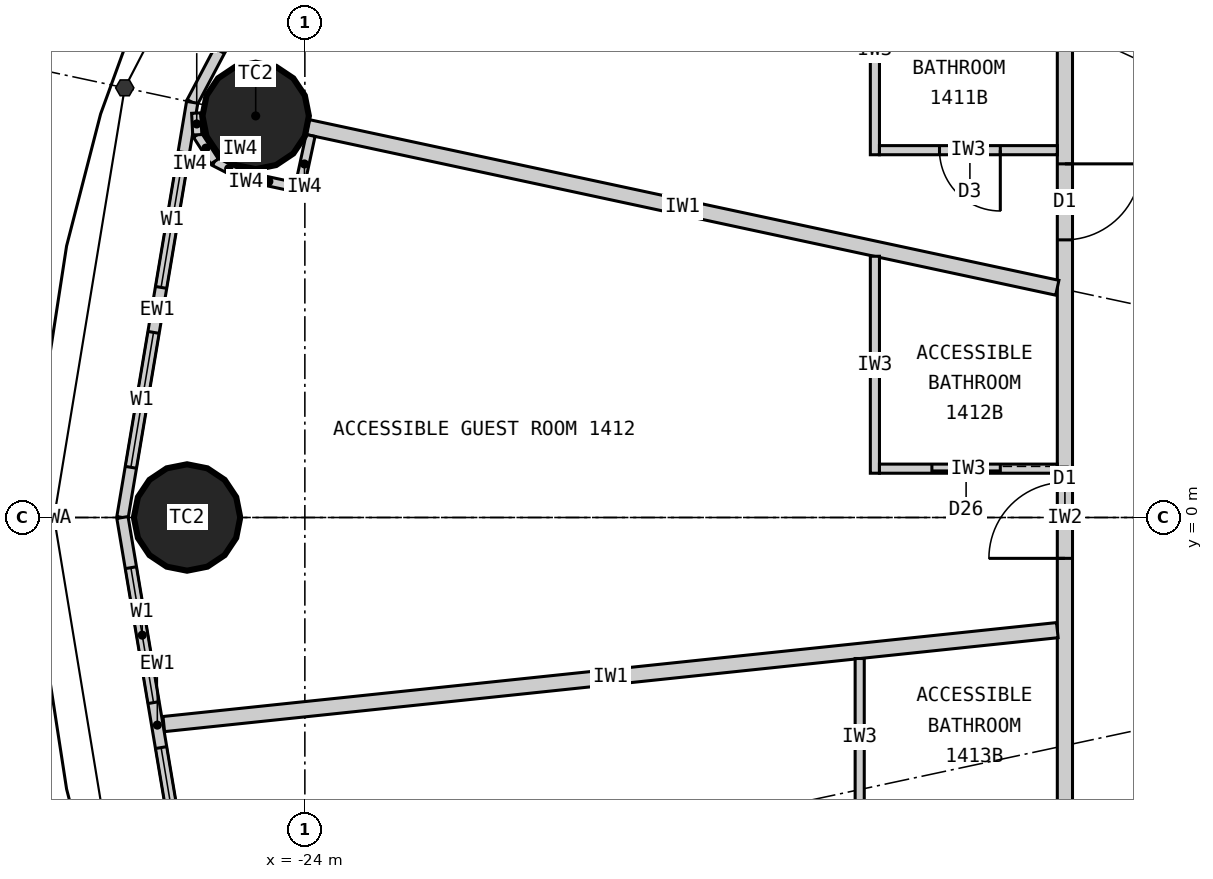
"""IFC4 building model, lengths in metres.
Left out: names, types, materials, properties, quantities, classifications, styles, units other than length and angle.
Written with IfcOpenShell. Run it as: python <this file> out.ifc"""

import sys

from ifc_helpers import new_model, si_unit, direction, frame, frame_2d, origin, origin_2d, place, context, subcontext, project, spatial, rectangle, circle, extrude, element, fill, save


model = new_model("IFC4")
c1 = context("Model", 3, precision=1e-05, world=origin(), true_north=direction((0.0, 1.0)))
c2 = subcontext(c1, "Body", "Model", "MODEL_VIEW")
j1 = project(units=[si_unit("LENGTHUNIT", "METRE"), si_unit("PLANEANGLEUNIT", "RADIAN")], contexts=[c1])
p1 = place(None, origin())
s1 = spatial("IfcSite", under=j1, at=p1, CompositionType="ELEMENT")
p2 = place(p1, origin())
s2 = spatial("IfcBuilding", under=s1, at=p2, CompositionType="ELEMENT")
p3 = place(p2, frame((0.0, 0.0, 60.6)))
s3 = spatial("IfcBuildingStorey", under=s2, at=p3, CompositionType="ELEMENT", Elevation=60.6)
for number, where, z_axis, x_axis in (
    (1, (-24.647, 5.283, 0.0), (0.0, 0.0, 1.0), (1.0, 0.0, 0.0)),
    (2, (-25.55, 0.0, 0.0), (0.0, 0.0, 1.0), (1.0, 0.0, 0.0)),
):
    element("IfcColumn", number, at=place(p3, frame(where, z_axis=z_axis, x_axis=x_axis)), inside=s3, PredefinedType="COLUMN", context=c2, shape_type="SweptSolid", body=[
        extrude(circle(Radius=0.7, at=origin_2d()), origin(), (0.0, 0.0, 1.0), 3.3),
    ])
p4 = place(p3, frame((-22.803, 10.532, 0.0), z_axis=(0.0, 0.0, 1.0), x_axis=(-0.467296867008, -0.884100468321, 0.0)))
e3 = element("IfcWall", 3, at=p4, inside=s3, PredefinedType="ELEMENTEDWALL", context=c2, shape_type="SweptSolid", body=[
    extrude(rectangle(XDim=5.734, YDim=0.15, at=frame_2d((2.867, 0.0))), origin(), (0.0, 0.0, 1.0), 3.12),
])
p5 = place(p4, frame((0.767, 0.0, 0.9)))
e4 = element("IfcOpeningElement", 4, at=p5, cuts=e3, PredefinedType="OPENING", context=c2, shape_type="SweptSolid", body=[
    extrude(rectangle(XDim=1.8, YDim=1.9, at=frame_2d((0.9, 0.95))), frame((0.0, 0.085, 0.0), z_axis=(0.0, -1.0, 0.0), x_axis=(1.0, 0.0, 0.0)), (0.0, 0.0, 1.0), 0.17),
])
p6 = place(p4, frame((3.167, 0.0, 0.9)))
e5 = element("IfcOpeningElement", 5, at=p6, cuts=e3, PredefinedType="OPENING", context=c2, shape_type="SweptSolid", body=[
    extrude(rectangle(XDim=1.8, YDim=1.9, at=frame_2d((0.9, 0.95))), frame((0.0, 0.085, 0.0), z_axis=(0.0, -1.0, 0.0), x_axis=(1.0, 0.0, 0.0)), (0.0, 0.0, 1.0), 0.17),
])
p7 = place(p3, frame((-25.482, 5.462, 0.0), z_axis=(0.0, 0.0, 1.0), x_axis=(-0.165642551694, -0.986185857264, 0.0)))
e6 = element("IfcWall", 6, at=p7, inside=s3, PredefinedType="ELEMENTEDWALL", context=c2, shape_type="SweptSolid", body=[
    extrude(rectangle(XDim=5.539, YDim=0.15, at=frame_2d((2.77, 0.0))), origin(), (0.0, 0.0, 1.0), 3.12),
])
p8 = place(p7, frame((0.669, 0.0, 0.9)))
e7 = element("IfcOpeningElement", 7, at=p8, cuts=e6, PredefinedType="OPENING", context=c2, shape_type="SweptSolid", body=[
    extrude(rectangle(XDim=1.8, YDim=1.9, at=frame_2d((0.9, 0.95))), frame((0.0, 0.085, 0.0), z_axis=(0.0, -1.0, 0.0), x_axis=(1.0, 0.0, 0.0)), (0.0, 0.0, 1.0), 0.17),
])
p9 = place(p7, frame((3.07, 0.0, 0.9)))
e8 = element("IfcOpeningElement", 8, at=p9, cuts=e6, PredefinedType="OPENING", context=c2, shape_type="SweptSolid", body=[
    extrude(rectangle(XDim=1.8, YDim=1.9, at=frame_2d((0.9, 0.95))), frame((0.0, 0.085, 0.0), z_axis=(0.0, -1.0, 0.0), x_axis=(1.0, 0.0, 0.0)), (0.0, 0.0, 1.0), 0.17),
])
p10 = place(p3, frame((-26.4, 0.0, 0.0), z_axis=(0.0, 0.0, 1.0), x_axis=(0.165642551694, -0.986185857264, 0.0)))
e9 = element("IfcWall", 9, at=p10, inside=s3, PredefinedType="ELEMENTEDWALL", context=c2, shape_type="SweptSolid", body=[
    extrude(rectangle(XDim=5.539, YDim=0.15, at=frame_2d((2.77, 0.0))), origin(), (0.0, 0.0, 1.0), 3.12),
])
p11 = place(p10, frame((0.669, 0.0, 0.9)))
e10 = element("IfcOpeningElement", 10, at=p11, cuts=e9, PredefinedType="OPENING", context=c2, shape_type="SweptSolid", body=[
    extrude(rectangle(XDim=1.8, YDim=1.9, at=frame_2d((0.9, 0.95))), frame((0.0, 0.085, 0.0), z_axis=(0.0, -1.0, 0.0), x_axis=(1.0, 0.0, 0.0)), (0.0, 0.0, 1.0), 0.17),
])
p12 = place(p10, frame((3.07, 0.0, 0.9)))
e11 = element("IfcOpeningElement", 11, at=p12, cuts=e9, PredefinedType="OPENING", context=c2, shape_type="SweptSolid", body=[
    extrude(rectangle(XDim=1.8, YDim=1.9, at=frame_2d((0.9, 0.95))), frame((0.0, 0.085, 0.0), z_axis=(0.0, -1.0, 0.0), x_axis=(1.0, 0.0, 0.0)), (0.0, 0.0, 1.0), 0.17),
])
p13 = place(p3, frame((-14.0, 9.9, 0.0), z_axis=(0.0, 0.0, 1.0), x_axis=(0.0, -1.0, 0.0)))
e12 = element("IfcWall", 12, at=p13, inside=s3, PredefinedType="PARTITIONING", context=c2, shape_type="SweptSolid", body=[
    extrude(rectangle(XDim=19.8, YDim=0.2, at=frame_2d((9.9, 0.0))), origin(), (0.0, 0.0, 1.0), 3.12),
])
p14 = place(p13, frame((0.103, 0.0, 0.0)))
e13 = element("IfcOpeningElement", 13, at=p14, cuts=e12, PredefinedType="OPENING", context=c2, shape_type="SweptSolid", body=[
    extrude(rectangle(XDim=1.0, YDim=2.2, at=frame_2d((0.5, 1.1))), frame((0.0, 0.11, 0.0), z_axis=(0.0, -1.0, 0.0), x_axis=(1.0, 0.0, 0.0)), (0.0, 0.0, 1.0), 0.22),
])
p15 = place(p13, frame((5.248, 0.0, 0.0)))
e14 = element("IfcOpeningElement", 14, at=p15, cuts=e12, PredefinedType="OPENING", context=c2, shape_type="SweptSolid", body=[
    extrude(rectangle(XDim=1.0, YDim=2.2, at=frame_2d((0.5, 1.1))), frame((0.0, 0.11, 0.0), z_axis=(0.0, -1.0, 0.0), x_axis=(1.0, 0.0, 0.0)), (0.0, 0.0, 1.0), 0.22),
])
p16 = place(p13, frame((9.438, 0.0, 0.0)))
e15 = element("IfcOpeningElement", 15, at=p16, cuts=e12, PredefinedType="OPENING", context=c2, shape_type="SweptSolid", body=[
    extrude(rectangle(XDim=1.0, YDim=2.2, at=frame_2d((0.5, 1.1))), frame((0.0, 0.11, 0.0), z_axis=(0.0, -1.0, 0.0), x_axis=(1.0, 0.0, 0.0)), (0.0, 0.0, 1.0), 0.22),
])
p17 = place(p13, frame((13.942, 0.0, 0.0)))
e16 = element("IfcOpeningElement", 16, at=p17, cuts=e12, PredefinedType="OPENING", context=c2, shape_type="SweptSolid", body=[
    extrude(rectangle(XDim=1.0, YDim=2.2, at=frame_2d((0.5, 1.1))), frame((0.0, 0.11, 0.0), z_axis=(0.0, -1.0, 0.0), x_axis=(1.0, 0.0, 0.0)), (0.0, 0.0, 1.0), 0.22),
])
p18 = place(p13, frame((18.698, 0.0, 0.0)))
e17 = element("IfcOpeningElement", 17, at=p18, cuts=e12, PredefinedType="OPENING", context=c2, shape_type="SweptSolid", body=[
    extrude(rectangle(XDim=1.0, YDim=2.2, at=frame_2d((0.5, 1.1))), frame((0.0, 0.11, 0.0), z_axis=(0.0, -1.0, 0.0), x_axis=(1.0, 0.0, 0.0)), (0.0, 0.0, 1.0), 0.22),
])
p19 = place(p3, frame((-14.1, 3.022, 0.0), z_axis=(0.0, 0.0, 1.0), x_axis=(-0.977790014929, 0.209586943072, 0.0)))
e18 = element("IfcWall", 18, at=p19, inside=s3, PredefinedType="PARTITIONING", context=c2, shape_type="SweptSolid", body=[
    extrude(rectangle(XDim=10.087, YDim=0.2, at=frame_2d((5.043, 0.0))), origin(), (0.0, 0.0, 1.0), 2.32),
])
p20 = place(p3, frame((-14.1, -1.482, 0.0), z_axis=(0.0, 0.0, 1.0), x_axis=(-0.994522076235, -0.104526742422, 0.0)))
e19 = element("IfcWall", 19, at=p20, inside=s3, PredefinedType="PARTITIONING", context=c2, shape_type="SweptSolid", body=[
    extrude(rectangle(XDim=11.821, YDim=0.2, at=frame_2d((5.91, 0.0))), origin(), (0.0, 0.0, 1.0), 2.32),
])
p21 = place(p3, frame((-16.5, 7.521, 0.0), z_axis=(0.0, 0.0, 1.0), x_axis=(0.0, -1.0, 0.0)))
e20 = element("IfcWall", 20, at=p21, inside=s3, PredefinedType="PARTITIONING", context=c2, shape_type="SweptSolid", body=[
    extrude(rectangle(XDim=2.749, YDim=0.12, at=frame_2d((1.374, 0.0))), origin(), (0.0, 0.0, 1.0), 3.12),
])
p22 = place(p3, frame((-14.1, 4.833, 0.0), z_axis=(0.0, 0.0, 1.0), x_axis=(-1.0, 0.0, 0.0)))
e21 = element("IfcWall", 21, at=p22, inside=s3, PredefinedType="PARTITIONING", context=c2, shape_type="SweptSolid", body=[
    extrude(rectangle(XDim=2.34, YDim=0.12, at=frame_2d((1.17, 0.0))), origin(), (0.0, 0.0, 1.0), 3.12),
])
p23 = place(p22, frame((0.75, 0.0, 0.0)))
e22 = element("IfcOpeningElement", 22, at=p23, cuts=e21, PredefinedType="OPENING", context=c2, shape_type="SweptSolid", body=[
    extrude(rectangle(XDim=0.8, YDim=2.1, at=frame_2d((0.4, 1.05))), frame((0.0, 0.07, 0.0), z_axis=(0.0, -1.0, 0.0), x_axis=(1.0, 0.0, 0.0)), (0.0, 0.0, 1.0), 0.14),
])
p24 = place(p3, frame((-16.5, 3.437, 0.0), z_axis=(0.0, 0.0, 1.0), x_axis=(0.0, -1.0, 0.0)))
e23 = element("IfcWall", 23, at=p24, inside=s3, PredefinedType="PARTITIONING", context=c2, shape_type="SweptSolid", body=[
    extrude(rectangle(XDim=2.854, YDim=0.12, at=frame_2d((1.427, 0.0))), origin(), (0.0, 0.0, 1.0), 3.12),
])
p25 = place(p3, frame((-14.1, 0.643, 0.0), z_axis=(0.0, 0.0, 1.0), x_axis=(-1.0, 0.0, 0.0)))
e24 = element("IfcWall", 24, at=p25, inside=s3, PredefinedType="PARTITIONING", context=c2, shape_type="SweptSolid", body=[
    extrude(rectangle(XDim=2.34, YDim=0.12, at=frame_2d((1.17, 0.0))), origin(), (0.0, 0.0, 1.0), 3.12),
])
p26 = place(p25, frame((0.75, 0.0, 0.0)))
e25 = element("IfcOpeningElement", 25, at=p26, cuts=e24, PredefinedType="OPENING", context=c2, shape_type="SweptSolid", body=[
    extrude(rectangle(XDim=0.9, YDim=2.1, at=frame_2d((0.45, 1.05))), frame((0.0, 0.07, 0.0), z_axis=(0.0, -1.0, 0.0), x_axis=(1.0, 0.0, 0.0)), (0.0, 0.0, 1.0), 0.14),
])
p27 = place(p3, frame((-16.7, -1.855, 0.0), z_axis=(0.0, 0.0, 1.0), x_axis=(0.0, -1.0, 0.0)))
e26 = element("IfcWall", 26, at=p27, inside=s3, PredefinedType="PARTITIONING", context=c2, shape_type="SweptSolid", body=[
    extrude(rectangle(XDim=2.067, YDim=0.12, at=frame_2d((1.033, 0.0))), origin(), (0.0, 0.0, 1.0), 3.12),
])
p28 = place(p3, frame((-23.925, 5.026, 0.0), z_axis=(0.0, 0.0, 1.0), x_axis=(-0.209681192172, -0.977769808109, 0.0)))
e27 = element("IfcWall", 27, at=p28, inside=s3, PredefinedType="PARTITIONING", context=c2, shape_type="SweptSolid", body=[
    extrude(rectangle(XDim=0.767, YDim=0.12, at=frame_2d((0.384, 0.0))), origin(), (0.0, 0.0, 1.0), 3.12),
])
p29 = place(p3, frame((-24.132, 4.347, 0.0), z_axis=(0.0, 0.0, 1.0), x_axis=(-0.977776882509, 0.209648200638, 0.0)))
e28 = element("IfcWall", 28, at=p29, inside=s3, PredefinedType="PARTITIONING", context=c2, shape_type="SweptSolid", body=[
    extrude(rectangle(XDim=0.7, YDim=0.12, at=frame_2d((0.35, 0.0))), origin(), (0.0, 0.0, 1.0), 3.12),
])
for number, where, z_axis, x_axis in (
    (29, (-24.816, 4.494, 0.0), (0.0, 0.0, 1.0), (-0.89, 0.455, 0.0)),
    (30, (-25.188, 4.684, 0.0), (0.0, 0.0, 1.0), (-0.543, 0.84, 0.0)),
):
    element("IfcWall", number, at=place(p3, frame(where, z_axis=z_axis, x_axis=x_axis)), inside=s3, PredefinedType="PARTITIONING", context=c2, shape_type="SweptSolid", body=[
        extrude(rectangle(XDim=0.418, YDim=0.12, at=frame_2d((0.209, 0.0))), origin(), (0.0, 0.0, 1.0), 3.12),
    ])
p30 = place(p3, frame((-25.416, 5.035, 0.0), z_axis=(0.0, 0.0, 1.0), x_axis=(-0.050406329159, 0.998728793007, 0.0)))
e31 = element("IfcWall", 31, at=p30, inside=s3, PredefinedType="PARTITIONING", context=c2, shape_type="SweptSolid", body=[
    extrude(rectangle(XDim=0.286, YDim=0.12, at=frame_2d((0.143, 0.0))), origin(), (0.0, 0.0, 1.0), 3.12),
])
p31 = place(p8, origin())
e32 = element("IfcWindow", 32, at=p31, inside=s3, PartitioningType="SINGLE_PANEL", PredefinedType="WINDOW", context=c2, shape_type="SweptSolid", body=[
    extrude(rectangle(XDim=1.8, YDim=1.9, at=frame_2d((0.9, 0.95))), frame((0.0, 0.03, 0.0), z_axis=(0.0, -1.0, 0.0), x_axis=(1.0, 0.0, 0.0)), (0.0, 0.0, 1.0), 0.06),
])
fill(e7, e32)
p32 = place(p9, origin())
e33 = element("IfcWindow", 33, at=p32, inside=s3, PartitioningType="SINGLE_PANEL", PredefinedType="WINDOW", context=c2, shape_type="SweptSolid", body=[
    extrude(rectangle(XDim=1.8, YDim=1.9, at=frame_2d((0.9, 0.95))), frame((0.0, 0.03, 0.0), z_axis=(0.0, -1.0, 0.0), x_axis=(1.0, 0.0, 0.0)), (0.0, 0.0, 1.0), 0.06),
])
fill(e8, e33)
p33 = place(p11, origin())
e34 = element("IfcWindow", 34, at=p33, inside=s3, PartitioningType="SINGLE_PANEL", PredefinedType="WINDOW", context=c2, shape_type="SweptSolid", body=[
    extrude(rectangle(XDim=1.8, YDim=1.9, at=frame_2d((0.9, 0.95))), frame((0.0, 0.03, 0.0), z_axis=(0.0, -1.0, 0.0), x_axis=(1.0, 0.0, 0.0)), (0.0, 0.0, 1.0), 0.06),
])
fill(e10, e34)
p34 = place(p12, origin())
e35 = element("IfcWindow", 35, at=p34, inside=s3, PartitioningType="SINGLE_PANEL", PredefinedType="WINDOW", context=c2, shape_type="SweptSolid", body=[
    extrude(rectangle(XDim=1.8, YDim=1.9, at=frame_2d((0.9, 0.95))), frame((0.0, 0.03, 0.0), z_axis=(0.0, -1.0, 0.0), x_axis=(1.0, 0.0, 0.0)), (0.0, 0.0, 1.0), 0.06),
])
fill(e11, e35)
p35 = place(p23, origin())
e36 = element("IfcDoor", 36, at=p35, inside=s3, OperationType="SINGLE_SWING_LEFT", PredefinedType="DOOR", context=c2, shape_type="SweptSolid", body=[
    extrude(rectangle(XDim=0.8, YDim=2.1, at=frame_2d((0.4, 1.05))), frame((0.0, 0.025, 0.0), z_axis=(0.0, -1.0, 0.0), x_axis=(1.0, 0.0, 0.0)), (0.0, 0.0, 1.0), 0.05),
])
fill(e22, e36)
p36 = place(p15, origin())
e37 = element("IfcDoor", 37, at=p36, inside=s3, OperationType="SINGLE_SWING_LEFT", PredefinedType="DOOR", context=c2, shape_type="SweptSolid", body=[
    extrude(rectangle(XDim=1.0, YDim=2.2, at=frame_2d((0.5, 1.1))), frame((0.0, 0.025, 0.0), z_axis=(0.0, -1.0, 0.0), x_axis=(1.0, 0.0, 0.0)), (0.0, 0.0, 1.0), 0.05),
])
fill(e14, e37)
p37 = place(p26, origin())
e38 = element("IfcDoor", 38, at=p37, inside=s3, OperationType="SLIDING_TO_LEFT", PredefinedType="DOOR", context=c2, shape_type="SweptSolid", body=[
    extrude(rectangle(XDim=0.9, YDim=2.1, at=frame_2d((0.45, 1.05))), frame((0.0, 0.025, 0.0), z_axis=(0.0, -1.0, 0.0), x_axis=(1.0, 0.0, 0.0)), (0.0, 0.0, 1.0), 0.05),
])
fill(e25, e38)
p38 = place(p16, origin())
e39 = element("IfcDoor", 39, at=p38, inside=s3, OperationType="SINGLE_SWING_RIGHT", PredefinedType="DOOR", context=c2, shape_type="SweptSolid", body=[
    extrude(rectangle(XDim=1.0, YDim=2.2, at=frame_2d((0.5, 1.1))), frame((0.0, 0.025, 0.0), z_axis=(0.0, -1.0, 0.0), x_axis=(1.0, 0.0, 0.0)), (0.0, 0.0, 1.0), 0.05),
])
fill(e15, e39)
save(model, sys.argv[1])
